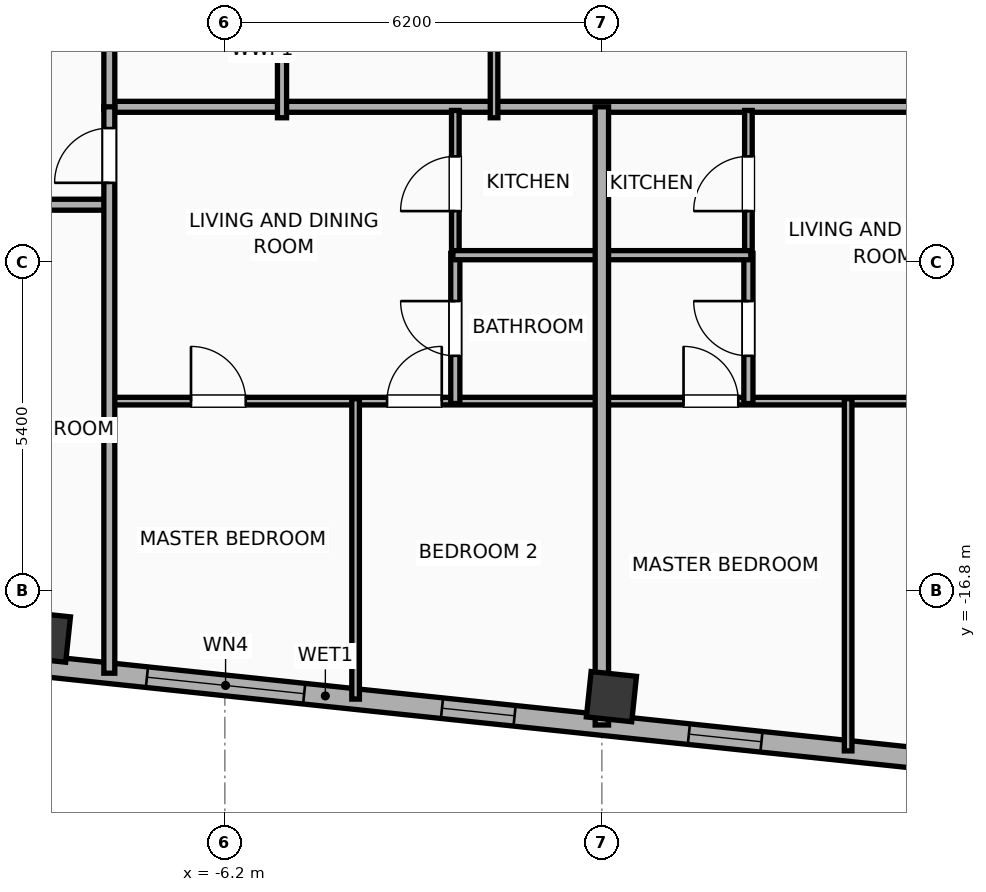
"""IFC4 building model, lengths in metres.
Left out: names, types, materials, properties, quantities, classifications, styles, units other than length and angle.
Written with IfcOpenShell. Run it as: python <this file> out.ifc"""

import sys

from ifc_helpers import new_model, si_unit, direction, frame, frame_2d, origin, origin_2d, place, context, subcontext, project, spatial, rectangle, hollow_rectangle, extrude, element, fill, save


model = new_model("IFC4")
c1 = context("Model", 3, precision=1e-05, world=origin(), true_north=direction((0.0, 1.0)))
c2 = subcontext(c1, "Body", "Model", "MODEL_VIEW")
j1 = project(units=[si_unit("LENGTHUNIT", "METRE"), si_unit("PLANEANGLEUNIT", "RADIAN")], contexts=[c1])
p1 = place(None, origin())
s1 = spatial("IfcSite", under=j1, at=p1, CompositionType="ELEMENT")
p2 = place(p1, origin())
s2 = spatial("IfcBuilding", under=s1, at=p2, CompositionType="ELEMENT")
p3 = place(p2, frame((0.0, 0.0, 306.8)))
s3 = spatial("IfcBuildingStorey", under=s2, at=p3, CompositionType="ELEMENT", Elevation=306.8)
for number, where, z_axis, x_axis in (
    (1, (-9.152, -17.561, 0.0), (0.0, 0.0, 1.0), (0.995, -0.105, 0.0)),
    (2, (0.157, -18.54, 0.0), (0.0, 0.0, 1.0), (0.995, -0.105, 0.0)),
):
    element("IfcColumn", number, at=place(p3, frame(where, z_axis=z_axis, x_axis=x_axis)), inside=s3, PredefinedType="COLUMN", context=c2, shape_type="SweptSolid", body=[
        extrude(hollow_rectangle(XDim=0.75, YDim=0.75, WallThickness=0.025, at=origin_2d()), origin(), (0.0, 0.0, 1.0), 3.865),
    ])
p4 = place(p3, frame((18.708, -20.972, 0.0), z_axis=(0.0, 0.0, 1.0), x_axis=(-0.994521888554, 0.104528528102, 0.0)))
e3 = element("IfcWall", 3, at=p4, inside=s3, PredefinedType="ELEMENTEDWALL", context=c2, shape_type="SweptSolid", body=[
    extrude(rectangle(XDim=46.766, YDim=0.34, at=frame_2d((23.383, 0.0))), origin(), (0.0, 0.0, 1.0), 2.39),
])
p5 = place(p4, frame((23.733, 0.0, 0.65)))
e4 = element("IfcOpeningElement", 4, at=p5, cuts=e3, PredefinedType="OPENING", context=c2, shape_type="SweptSolid", body=[
    extrude(rectangle(XDim=2.6, YDim=1.45, at=frame_2d((1.3, 0.725))), frame((0.0, 0.18, 0.0), z_axis=(0.0, -1.0, 0.0), x_axis=(1.0, 0.0, 0.0)), (0.0, 0.0, 1.0), 0.36),
])
p6 = place(p4, frame((44.402, 0.0, 0.55)))
e5 = element("IfcOpeningElement", 5, at=p6, cuts=e3, PredefinedType="OPENING", context=c2, shape_type="SweptSolid", body=[
    extrude(rectangle(XDim=1.2, YDim=1.15, at=frame_2d((0.6, 0.575))), frame((0.0, 0.18, 0.0), z_axis=(0.0, -1.0, 0.0), x_axis=(1.0, 0.0, 0.0)), (0.0, 0.0, 1.0), 0.36),
])
p7 = place(p4, frame((39.54, 0.0, 0.55)))
e6 = element("IfcOpeningElement", 6, at=p7, cuts=e3, PredefinedType="OPENING", context=c2, shape_type="SweptSolid", body=[
    extrude(rectangle(XDim=1.2, YDim=1.15, at=frame_2d((0.6, 0.575))), frame((0.0, 0.18, 0.0), z_axis=(0.0, -1.0, 0.0), x_axis=(1.0, 0.0, 0.0)), (0.0, 0.0, 1.0), 0.36),
])
p8 = place(p4, frame((42.406, 0.0, 0.55)))
e7 = element("IfcOpeningElement", 7, at=p8, cuts=e3, PredefinedType="OPENING", context=c2, shape_type="SweptSolid", body=[
    extrude(rectangle(XDim=1.2, YDim=1.15, at=frame_2d((0.6, 0.575))), frame((0.0, 0.18, 0.0), z_axis=(0.0, -1.0, 0.0), x_axis=(1.0, 0.0, 0.0)), (0.0, 0.0, 1.0), 0.36),
])
p9 = place(p4, frame((34.933, 0.0, 0.55)))
e8 = element("IfcOpeningElement", 8, at=p9, cuts=e3, PredefinedType="OPENING", context=c2, shape_type="SweptSolid", body=[
    extrude(rectangle(XDim=1.2, YDim=1.15, at=frame_2d((0.6, 0.575))), frame((0.0, 0.18, 0.0), z_axis=(0.0, -1.0, 0.0), x_axis=(1.0, 0.0, 0.0)), (0.0, 0.0, 1.0), 0.36),
])
p10 = place(p4, frame((28.631, 0.0, 0.55)))
e9 = element("IfcOpeningElement", 9, at=p10, cuts=e3, PredefinedType="OPENING", context=c2, shape_type="SweptSolid", body=[
    extrude(rectangle(XDim=1.2, YDim=1.15, at=frame_2d((0.6, 0.575))), frame((0.0, 0.18, 0.0), z_axis=(0.0, -1.0, 0.0), x_axis=(1.0, 0.0, 0.0)), (0.0, 0.0, 1.0), 0.36),
])
p11 = place(p4, frame((30.896, 0.0, 0.55)))
e10 = element("IfcOpeningElement", 10, at=p11, cuts=e3, PredefinedType="OPENING", context=c2, shape_type="SweptSolid", body=[
    extrude(rectangle(XDim=1.2, YDim=1.15, at=frame_2d((0.6, 0.575))), frame((0.0, 0.18, 0.0), z_axis=(0.0, -1.0, 0.0), x_axis=(1.0, 0.0, 0.0)), (0.0, 0.0, 1.0), 0.36),
])
p12 = place(p4, frame((7.501, 0.0, 0.55)))
e11 = element("IfcOpeningElement", 11, at=p12, cuts=e3, PredefinedType="OPENING", context=c2, shape_type="SweptSolid", body=[
    extrude(rectangle(XDim=1.2, YDim=1.15, at=frame_2d((0.6, 0.575))), frame((0.0, 0.18, 0.0), z_axis=(0.0, -1.0, 0.0), x_axis=(1.0, 0.0, 0.0)), (0.0, 0.0, 1.0), 0.36),
])
p13 = place(p4, frame((4.159, 0.0, 0.55)))
e12 = element("IfcOpeningElement", 12, at=p13, cuts=e3, PredefinedType="OPENING", context=c2, shape_type="SweptSolid", body=[
    extrude(rectangle(XDim=1.2, YDim=1.15, at=frame_2d((0.6, 0.575))), frame((0.0, 0.18, 0.0), z_axis=(0.0, -1.0, 0.0), x_axis=(1.0, 0.0, 0.0)), (0.0, 0.0, 1.0), 0.36),
])
p14 = place(p4, frame((1.369, 0.0, 0.55)))
e13 = element("IfcOpeningElement", 13, at=p14, cuts=e3, PredefinedType="OPENING", context=c2, shape_type="SweptSolid", body=[
    extrude(rectangle(XDim=1.2, YDim=1.15, at=frame_2d((0.6, 0.575))), frame((0.0, 0.18, 0.0), z_axis=(0.0, -1.0, 0.0), x_axis=(1.0, 0.0, 0.0)), (0.0, 0.0, 1.0), 0.36),
])
p15 = place(p4, frame((20.254, 0.0, 0.55)))
e14 = element("IfcOpeningElement", 14, at=p15, cuts=e3, PredefinedType="OPENING", context=c2, shape_type="SweptSolid", body=[
    extrude(rectangle(XDim=1.2, YDim=1.15, at=frame_2d((0.6, 0.575))), frame((0.0, 0.18, 0.0), z_axis=(0.0, -1.0, 0.0), x_axis=(1.0, 0.0, 0.0)), (0.0, 0.0, 1.0), 0.36),
])
p16 = place(p4, frame((16.172, 0.0, 0.55)))
e15 = element("IfcOpeningElement", 15, at=p16, cuts=e3, PredefinedType="OPENING", context=c2, shape_type="SweptSolid", body=[
    extrude(rectangle(XDim=1.2, YDim=1.15, at=frame_2d((0.6, 0.575))), frame((0.0, 0.18, 0.0), z_axis=(0.0, -1.0, 0.0), x_axis=(1.0, 0.0, 0.0)), (0.0, 0.0, 1.0), 0.36),
])
p17 = place(p4, frame((12.11, 0.0, 0.55)))
e16 = element("IfcOpeningElement", 16, at=p17, cuts=e3, PredefinedType="OPENING", context=c2, shape_type="SweptSolid", body=[
    extrude(rectangle(XDim=1.2, YDim=1.15, at=frame_2d((0.6, 0.575))), frame((0.0, 0.18, 0.0), z_axis=(0.0, -1.0, 0.0), x_axis=(1.0, 0.0, 0.0)), (0.0, 0.0, 1.0), 0.36),
])
p18 = place(p3, frame((-8.15, -8.84, 0.0), z_axis=(0.0, 0.0, 1.0), x_axis=(1.0, 0.0, 0.0)))
e17 = element("IfcWall", 17, at=p18, inside=s3, PredefinedType="PARTITIONING", context=c2, shape_type="SweptSolid", body=[
    extrude(rectangle(XDim=16.3, YDim=0.18, at=frame_2d((8.15, 0.0))), origin(), (0.0, 0.0, 1.0), 3.5),
])
p19 = place(p3, frame((-8.1, -8.88, 0.0), z_axis=(0.0, 0.0, 1.0), x_axis=(0.0, 1.0, 0.0)))
e18 = element("IfcWall", 18, at=p19, inside=s3, PredefinedType="PARTITIONING", context=c2, shape_type="SweptSolid", body=[
    extrude(rectangle(XDim=17.76, YDim=0.18, at=frame_2d((8.88, 0.0))), origin(), (0.0, 0.0, 1.0), 3.5),
])
p20 = place(p19, frame((1.276, 0.0, 0.0)))
e19 = element("IfcOpeningElement", 19, at=p20, cuts=e18, PredefinedType="OPENING", context=c2, shape_type="SweptSolid", body=[
    extrude(rectangle(XDim=1.0, YDim=2.05, at=frame_2d((0.5, 1.025))), frame((0.0, 0.1, 0.0), z_axis=(0.0, -1.0, 0.0), x_axis=(1.0, 0.0, 0.0)), (0.0, 0.0, 1.0), 0.2),
])
p21 = place(p19, frame((10.181, 0.0, 0.0)))
e20 = element("IfcOpeningElement", 20, at=p21, cuts=e18, PredefinedType="OPENING", context=c2, shape_type="SweptSolid", body=[
    extrude(rectangle(XDim=0.95, YDim=2.05, at=frame_2d((0.475, 1.025))), frame((0.0, 0.1, 0.0), z_axis=(0.0, -1.0, 0.0), x_axis=(1.0, 0.0, 0.0)), (0.0, 0.0, 1.0), 0.2),
])
p22 = place(p3, frame((-5.26, -9.02, 0.0), z_axis=(0.0, 0.0, 1.0), x_axis=(0.0, 1.0, 0.0)))
e21 = element("IfcWall", 21, at=p22, inside=s3, PredefinedType="PLUMBINGWALL", context=c2, shape_type="SweptSolid", body=[
    extrude(rectangle(XDim=3.35, YDim=0.15, at=frame_2d((1.675, 0.0))), origin(), (0.0, 0.0, 1.0), 3.5),
])
p23 = place(p3, frame((-1.773, -9.02, 0.0), z_axis=(0.0, 0.0, 1.0), x_axis=(0.0, 1.0, 0.0)))
e22 = element("IfcWall", 22, at=p23, inside=s3, PredefinedType="PARTITIONING", context=c2, shape_type="SweptSolid", body=[
    extrude(rectangle(XDim=17.99, YDim=0.125, at=frame_2d((8.995, 0.0))), origin(), (0.0, 0.0, 1.0), 3.5),
])
p24 = place(p23, frame((8.52, 0.0, 0.0)))
e23 = element("IfcOpeningElement", 23, at=p24, cuts=e22, PredefinedType="OPENING", context=c2, shape_type="SweptSolid", body=[
    extrude(rectangle(XDim=0.95, YDim=2.05, at=frame_2d((0.475, 1.025))), frame((0.0, 0.073, 0.0), z_axis=(0.0, -1.0, 0.0), x_axis=(1.0, 0.0, 0.0)), (0.0, 0.0, 1.0), 0.145),
])
p25 = place(p3, frame((-30.676, -10.45, 0.0), z_axis=(0.0, 0.0, 1.0), x_axis=(1.0, 0.0, 0.0)))
e24 = element("IfcWall", 24, at=p25, inside=s3, PredefinedType="PARTITIONING", context=c2, shape_type="SweptSolid", body=[
    extrude(rectangle(XDim=22.596, YDim=0.18, at=frame_2d((11.298, 0.0))), origin(), (0.0, 0.0, 1.0), 3.5),
])
p26 = place(p25, frame((2.336, 0.0, 0.0)))
e25 = element("IfcOpeningElement", 25, at=p26, cuts=e24, PredefinedType="OPENING", context=c2, shape_type="SweptSolid", body=[
    extrude(rectangle(XDim=0.9, YDim=2.05, at=frame_2d((0.45, 1.025))), frame((0.0, 0.1, 0.0), z_axis=(0.0, -1.0, 0.0), x_axis=(1.0, 0.0, 0.0)), (0.0, 0.0, 1.0), 0.2),
])
p27 = place(p25, frame((8.861, 0.0, 0.0)))
e26 = element("IfcOpeningElement", 26, at=p27, cuts=e24, PredefinedType="OPENING", context=c2, shape_type="SweptSolid", body=[
    extrude(rectangle(XDim=1.15, YDim=2.05, at=frame_2d((0.575, 1.025))), frame((0.0, 0.1, 0.0), z_axis=(0.0, -1.0, 0.0), x_axis=(1.0, 0.0, 0.0)), (0.0, 0.0, 1.0), 0.2),
])
p28 = place(p25, frame((13.774, 0.0, 0.0)))
e27 = element("IfcOpeningElement", 27, at=p28, cuts=e24, PredefinedType="OPENING", context=c2, shape_type="SweptSolid", body=[
    extrude(rectangle(XDim=0.9, YDim=2.05, at=frame_2d((0.45, 1.025))), frame((0.0, 0.1, 0.0), z_axis=(0.0, -1.0, 0.0), x_axis=(1.0, 0.0, 0.0)), (0.0, 0.0, 1.0), 0.2),
])
p29 = place(p25, frame((20.306, 0.0, 0.0)))
e28 = element("IfcOpeningElement", 28, at=p29, cuts=e24, PredefinedType="OPENING", context=c2, shape_type="SweptSolid", body=[
    extrude(rectangle(XDim=1.15, YDim=2.05, at=frame_2d((0.575, 1.025))), frame((0.0, 0.1, 0.0), z_axis=(0.0, -1.0, 0.0), x_axis=(1.0, 0.0, 0.0)), (0.0, 0.0, 1.0), 0.2),
])
p30 = place(p3, frame((-8.08, -13.68, 0.0), z_axis=(0.0, 0.0, 1.0), x_axis=(1.0, 0.0, 0.0)))
e29 = element("IfcWall", 29, at=p30, inside=s3, PredefinedType="PARTITIONING", context=c2, shape_type="SweptSolid", body=[
    extrude(rectangle(XDim=8.06, YDim=0.125, at=frame_2d((4.03, 0.0))), origin(), (0.0, 0.0, 1.0), 3.5),
])
p31 = place(p30, frame((1.323, 0.0, 0.0)))
e30 = element("IfcOpeningElement", 30, at=p31, cuts=e29, PredefinedType="OPENING", context=c2, shape_type="SweptSolid", body=[
    extrude(rectangle(XDim=0.9, YDim=2.05, at=frame_2d((0.45, 1.025))), frame((0.0, 0.073, 0.0), z_axis=(0.0, -1.0, 0.0), x_axis=(1.0, 0.0, 0.0)), (0.0, 0.0, 1.0), 0.145),
])
p32 = place(p30, frame((4.547, 0.0, 0.0)))
e31 = element("IfcOpeningElement", 31, at=p32, cuts=e29, PredefinedType="OPENING", context=c2, shape_type="SweptSolid", body=[
    extrude(rectangle(XDim=0.9, YDim=2.05, at=frame_2d((0.45, 1.025))), frame((0.0, 0.073, 0.0), z_axis=(0.0, -1.0, 0.0), x_axis=(1.0, 0.0, 0.0)), (0.0, 0.0, 1.0), 0.145),
])
p33 = place(p3, frame((-2.41, -11.31, 0.0), z_axis=(0.0, 0.0, 1.0), x_axis=(0.0, 1.0, 0.0)))
e32 = element("IfcWall", 32, at=p33, inside=s3, PredefinedType="PARTITIONING", context=c2, shape_type="SweptSolid", body=[
    extrude(rectangle(XDim=2.41, YDim=0.125, at=frame_2d((1.205, 0.0))), origin(), (0.0, 0.0, 1.0), 3.5),
])
p34 = place(p33, frame((0.755, 0.0, 0.0)))
e33 = element("IfcOpeningElement", 33, at=p34, cuts=e32, PredefinedType="OPENING", context=c2, shape_type="SweptSolid", body=[
    extrude(rectangle(XDim=0.9, YDim=2.05, at=frame_2d((0.45, 1.025))), frame((0.0, 0.073, 0.0), z_axis=(0.0, -1.0, 0.0), x_axis=(1.0, 0.0, 0.0)), (0.0, 0.0, 1.0), 0.145),
])
p35 = place(p3, frame((-2.41, -13.72, 0.0), z_axis=(0.0, 0.0, 1.0), x_axis=(0.0, 1.0, 0.0)))
e34 = element("IfcWall", 34, at=p35, inside=s3, PredefinedType="PLUMBINGWALL", context=c2, shape_type="SweptSolid", body=[
    extrude(rectangle(XDim=2.47, YDim=0.15, at=frame_2d((1.235, 0.0))), origin(), (0.0, 0.0, 1.0), 3.5),
])
p36 = place(p35, frame((0.785, 0.0, 0.0)))
e35 = element("IfcOpeningElement", 35, at=p36, cuts=e34, PredefinedType="OPENING", context=c2, shape_type="SweptSolid", body=[
    extrude(rectangle(XDim=0.9, YDim=2.05, at=frame_2d((0.45, 1.025))), frame((0.0, 0.085, 0.0), z_axis=(0.0, -1.0, 0.0), x_axis=(1.0, 0.0, 0.0)), (0.0, 0.0, 1.0), 0.17),
])
p37 = place(p3, frame((-2.45, -11.28, 0.0), z_axis=(0.0, 0.0, 1.0), x_axis=(1.0, 0.0, 0.0)))
e36 = element("IfcWall", 36, at=p37, inside=s3, PredefinedType="PLUMBINGWALL", context=c2, shape_type="SweptSolid", body=[
    extrude(rectangle(XDim=2.43, YDim=0.15, at=frame_2d((1.215, 0.0))), origin(), (0.0, 0.0, 1.0), 3.5),
])
p38 = place(p3, frame((-4.05, -18.58, 0.0), z_axis=(0.0, 0.0, 1.0), x_axis=(0.0, 1.0, 0.0)))
e37 = element("IfcWall", 37, at=p38, inside=s3, PredefinedType="PARTITIONING", context=c2, shape_type="SweptSolid", body=[
    extrude(rectangle(XDim=4.94, YDim=0.125, at=frame_2d((2.47, 0.0))), origin(), (0.0, 0.0, 1.0), 3.5),
])
p39 = place(p3, frame((-8.1, -18.155, 0.0), z_axis=(0.0, 0.0, 1.0), x_axis=(0.0, 1.0, 0.0)))
e38 = element("IfcWall", 38, at=p39, inside=s3, PredefinedType="PARTITIONING", context=c2, shape_type="SweptSolid", body=[
    extrude(rectangle(XDim=9.314, YDim=0.18, at=frame_2d((4.657, 0.0))), origin(), (0.0, 0.0, 1.0), 3.5),
])
p40 = place(p39, frame((8.064, 0.0, 0.0)))
e39 = element("IfcOpeningElement", 39, at=p40, cuts=e38, PredefinedType="OPENING", context=c2, shape_type="SweptSolid", body=[
    extrude(rectangle(XDim=0.9, YDim=2.05, at=frame_2d((0.45, 1.025))), frame((0.0, 0.1, 0.0), z_axis=(0.0, -1.0, 0.0), x_axis=(1.0, 0.0, 0.0)), (0.0, 0.0, 1.0), 0.2),
])
p41 = place(p3, frame((0.02, -13.68, 0.0), z_axis=(0.0, 0.0, 1.0), x_axis=(1.0, 0.0, 0.0)))
e40 = element("IfcWall", 40, at=p41, inside=s3, PredefinedType="PARTITIONING", context=c2, shape_type="SweptSolid", body=[
    extrude(rectangle(XDim=7.992, YDim=0.125, at=frame_2d((3.996, 0.0))), origin(), (0.0, 0.0, 1.0), 3.5),
])
p42 = place(p41, frame((1.323, 0.0, 0.0)))
e41 = element("IfcOpeningElement", 41, at=p42, cuts=e40, PredefinedType="OPENING", context=c2, shape_type="SweptSolid", body=[
    extrude(rectangle(XDim=0.9, YDim=2.05, at=frame_2d((0.45, 1.025))), frame((0.0, 0.073, 0.0), z_axis=(0.0, -1.0, 0.0), x_axis=(1.0, 0.0, 0.0)), (0.0, 0.0, 1.0), 0.145),
])
p43 = place(p41, frame((5.837, 0.0, 0.0)))
e42 = element("IfcOpeningElement", 42, at=p43, cuts=e40, PredefinedType="OPENING", context=c2, shape_type="SweptSolid", body=[
    extrude(rectangle(XDim=0.9, YDim=2.05, at=frame_2d((0.45, 1.025))), frame((0.0, 0.073, 0.0), z_axis=(0.0, -1.0, 0.0), x_axis=(1.0, 0.0, 0.0)), (0.0, 0.0, 1.0), 0.145),
])
p44 = place(p3, frame((2.41, -11.31, 0.0), z_axis=(0.0, 0.0, 1.0), x_axis=(0.0, 1.0, 0.0)))
e43 = element("IfcWall", 43, at=p44, inside=s3, PredefinedType="PARTITIONING", context=c2, shape_type="SweptSolid", body=[
    extrude(rectangle(XDim=2.41, YDim=0.125, at=frame_2d((1.205, 0.0))), origin(), (0.0, 0.0, 1.0), 2.39),
])
p45 = place(p44, frame((0.755, 0.0, 0.0)))
e44 = element("IfcOpeningElement", 44, at=p45, cuts=e43, PredefinedType="OPENING", context=c2, shape_type="SweptSolid", body=[
    extrude(rectangle(XDim=0.9, YDim=2.05, at=frame_2d((0.45, 1.025))), frame((0.0, 0.073, 0.0), z_axis=(0.0, -1.0, 0.0), x_axis=(1.0, 0.0, 0.0)), (0.0, 0.0, 1.0), 0.145),
])
p46 = place(p3, frame((2.41, -13.72, 0.0), z_axis=(0.0, 0.0, 1.0), x_axis=(0.0, 1.0, 0.0)))
e45 = element("IfcWall", 45, at=p46, inside=s3, PredefinedType="PLUMBINGWALL", context=c2, shape_type="SweptSolid", body=[
    extrude(rectangle(XDim=2.47, YDim=0.15, at=frame_2d((1.235, 0.0))), origin(), (0.0, 0.0, 1.0), 2.39),
])
p47 = place(p46, frame((0.785, 0.0, 0.0)))
e46 = element("IfcOpeningElement", 46, at=p47, cuts=e45, PredefinedType="OPENING", context=c2, shape_type="SweptSolid", body=[
    extrude(rectangle(XDim=0.9, YDim=2.05, at=frame_2d((0.45, 1.025))), frame((0.0, 0.085, 0.0), z_axis=(0.0, -1.0, 0.0), x_axis=(1.0, 0.0, 0.0)), (0.0, 0.0, 1.0), 0.17),
])
p48 = place(p3, frame((0.02, -11.28, 0.0), z_axis=(0.0, 0.0, 1.0), x_axis=(1.0, 0.0, 0.0)))
e47 = element("IfcWall", 47, at=p48, inside=s3, PredefinedType="PLUMBINGWALL", context=c2, shape_type="SweptSolid", body=[
    extrude(rectangle(XDim=2.43, YDim=0.15, at=frame_2d((1.215, 0.0))), origin(), (0.0, 0.0, 1.0), 3.5),
])
p49 = place(p3, frame((4.05, -19.432, 0.0), z_axis=(0.0, 0.0, 1.0), x_axis=(0.0, 1.0, 0.0)))
e48 = element("IfcWall", 48, at=p49, inside=s3, PredefinedType="PARTITIONING", context=c2, shape_type="SweptSolid", body=[
    extrude(rectangle(XDim=5.792, YDim=0.125, at=frame_2d((2.896, 0.0))), origin(), (0.0, 0.0, 1.0), 3.5),
])
p50 = place(p3, frame((0.0, -19.006, 0.0), z_axis=(0.0, 0.0, 1.0), x_axis=(0.0, 1.0, 0.0)))
e49 = element("IfcWall", 49, at=p50, inside=s3, PredefinedType="PARTITIONING", context=c2, shape_type="SweptSolid", body=[
    extrude(rectangle(XDim=10.166, YDim=0.22, at=frame_2d((5.083, 0.0))), origin(), (0.0, 0.0, 1.0), 2.39),
])
p51 = place(p5, origin())
e50 = element("IfcWindow", 50, at=p51, inside=s3, PartitioningType="SINGLE_PANEL", PredefinedType="WINDOW", context=c2, shape_type="SweptSolid", body=[
    extrude(rectangle(XDim=2.6, YDim=1.45, at=frame_2d((1.3, 0.725))), frame((0.0, 0.03, 0.0), z_axis=(0.0, -1.0, 0.0), x_axis=(1.0, 0.0, 0.0)), (0.0, 0.0, 1.0), 0.06),
])
fill(e4, e50)
p52 = place(p15, origin())
e51 = element("IfcWindow", 51, at=p52, inside=s3, PartitioningType="SINGLE_PANEL", PredefinedType="WINDOW", context=c2, shape_type="SweptSolid", body=[
    extrude(rectangle(XDim=1.2, YDim=1.15, at=frame_2d((0.6, 0.575))), frame((0.0, 0.03, 0.0), z_axis=(0.0, -1.0, 0.0), x_axis=(1.0, 0.0, 0.0)), (0.0, 0.0, 1.0), 0.06),
])
fill(e14, e51)
p53 = place(p16, origin())
e52 = element("IfcWindow", 52, at=p53, inside=s3, PartitioningType="SINGLE_PANEL", PredefinedType="WINDOW", context=c2, shape_type="SweptSolid", body=[
    extrude(rectangle(XDim=1.2, YDim=1.15, at=frame_2d((0.6, 0.575))), frame((0.0, 0.03, 0.0), z_axis=(0.0, -1.0, 0.0), x_axis=(1.0, 0.0, 0.0)), (0.0, 0.0, 1.0), 0.06),
])
fill(e15, e52)
p54 = place(p31, origin())
e53 = element("IfcDoor", 53, at=p54, inside=s3, OperationType="SINGLE_SWING_LEFT", PredefinedType="DOOR", context=c2, shape_type="SweptSolid", body=[
    extrude(rectangle(XDim=0.9, YDim=2.05, at=frame_2d((0.45, 1.025))), frame((0.0, 0.025, 0.0), z_axis=(0.0, -1.0, 0.0), x_axis=(1.0, 0.0, 0.0)), (0.0, 0.0, 1.0), 0.05),
])
fill(e30, e53)
p55 = place(p32, origin())
e54 = element("IfcDoor", 54, at=p55, inside=s3, OperationType="SINGLE_SWING_RIGHT", PredefinedType="DOOR", context=c2, shape_type="SweptSolid", body=[
    extrude(rectangle(XDim=0.9, YDim=2.05, at=frame_2d((0.45, 1.025))), frame((0.0, 0.025, 0.0), z_axis=(0.0, -1.0, 0.0), x_axis=(1.0, 0.0, 0.0)), (0.0, 0.0, 1.0), 0.05),
])
fill(e31, e54)
p56 = place(p34, origin())
e55 = element("IfcDoor", 55, at=p56, inside=s3, OperationType="SINGLE_SWING_LEFT", PredefinedType="DOOR", context=c2, shape_type="SweptSolid", body=[
    extrude(rectangle(XDim=0.9, YDim=2.05, at=frame_2d((0.45, 1.025))), frame((0.0, 0.025, 0.0), z_axis=(0.0, -1.0, 0.0), x_axis=(1.0, 0.0, 0.0)), (0.0, 0.0, 1.0), 0.05),
])
fill(e33, e55)
p57 = place(p36, origin())
e56 = element("IfcDoor", 56, at=p57, inside=s3, OperationType="SINGLE_SWING_RIGHT", PredefinedType="DOOR", context=c2, shape_type="SweptSolid", body=[
    extrude(rectangle(XDim=0.9, YDim=2.05, at=frame_2d((0.45, 1.025))), frame((0.0, 0.025, 0.0), z_axis=(0.0, -1.0, 0.0), x_axis=(1.0, 0.0, 0.0)), (0.0, 0.0, 1.0), 0.05),
])
fill(e35, e56)
p58 = place(p40, origin())
e57 = element("IfcDoor", 57, at=p58, inside=s3, OperationType="SINGLE_SWING_LEFT", PredefinedType="DOOR", context=c2, shape_type="SweptSolid", body=[
    extrude(rectangle(XDim=0.9, YDim=2.05, at=frame_2d((0.45, 1.025))), frame((0.0, 0.025, 0.0), z_axis=(0.0, -1.0, 0.0), x_axis=(1.0, 0.0, 0.0)), (0.0, 0.0, 1.0), 0.05),
])
fill(e39, e57)
p59 = place(p42, origin())
e58 = element("IfcDoor", 58, at=p59, inside=s3, OperationType="SINGLE_SWING_LEFT", PredefinedType="DOOR", context=c2, shape_type="SweptSolid", body=[
    extrude(rectangle(XDim=0.9, YDim=2.05, at=frame_2d((0.45, 1.025))), frame((0.0, 0.025, 0.0), z_axis=(0.0, -1.0, 0.0), x_axis=(1.0, 0.0, 0.0)), (0.0, 0.0, 1.0), 0.05),
])
fill(e41, e58)
p60 = place(p45, origin())
e59 = element("IfcDoor", 59, at=p60, inside=s3, OperationType="SINGLE_SWING_LEFT", PredefinedType="DOOR", context=c2, shape_type="SweptSolid", body=[
    extrude(rectangle(XDim=0.9, YDim=2.05, at=frame_2d((0.45, 1.025))), frame((0.0, 0.025, 0.0), z_axis=(0.0, -1.0, 0.0), x_axis=(1.0, 0.0, 0.0)), (0.0, 0.0, 1.0), 0.05),
])
fill(e44, e59)
p61 = place(p47, origin())
e60 = element("IfcDoor", 60, at=p61, inside=s3, OperationType="SINGLE_SWING_RIGHT", PredefinedType="DOOR", context=c2, shape_type="SweptSolid", body=[
    extrude(rectangle(XDim=0.9, YDim=2.05, at=frame_2d((0.45, 1.025))), frame((0.0, 0.025, 0.0), z_axis=(0.0, -1.0, 0.0), x_axis=(1.0, 0.0, 0.0)), (0.0, 0.0, 1.0), 0.05),
])
fill(e46, e60)
save(model, sys.argv[1])
